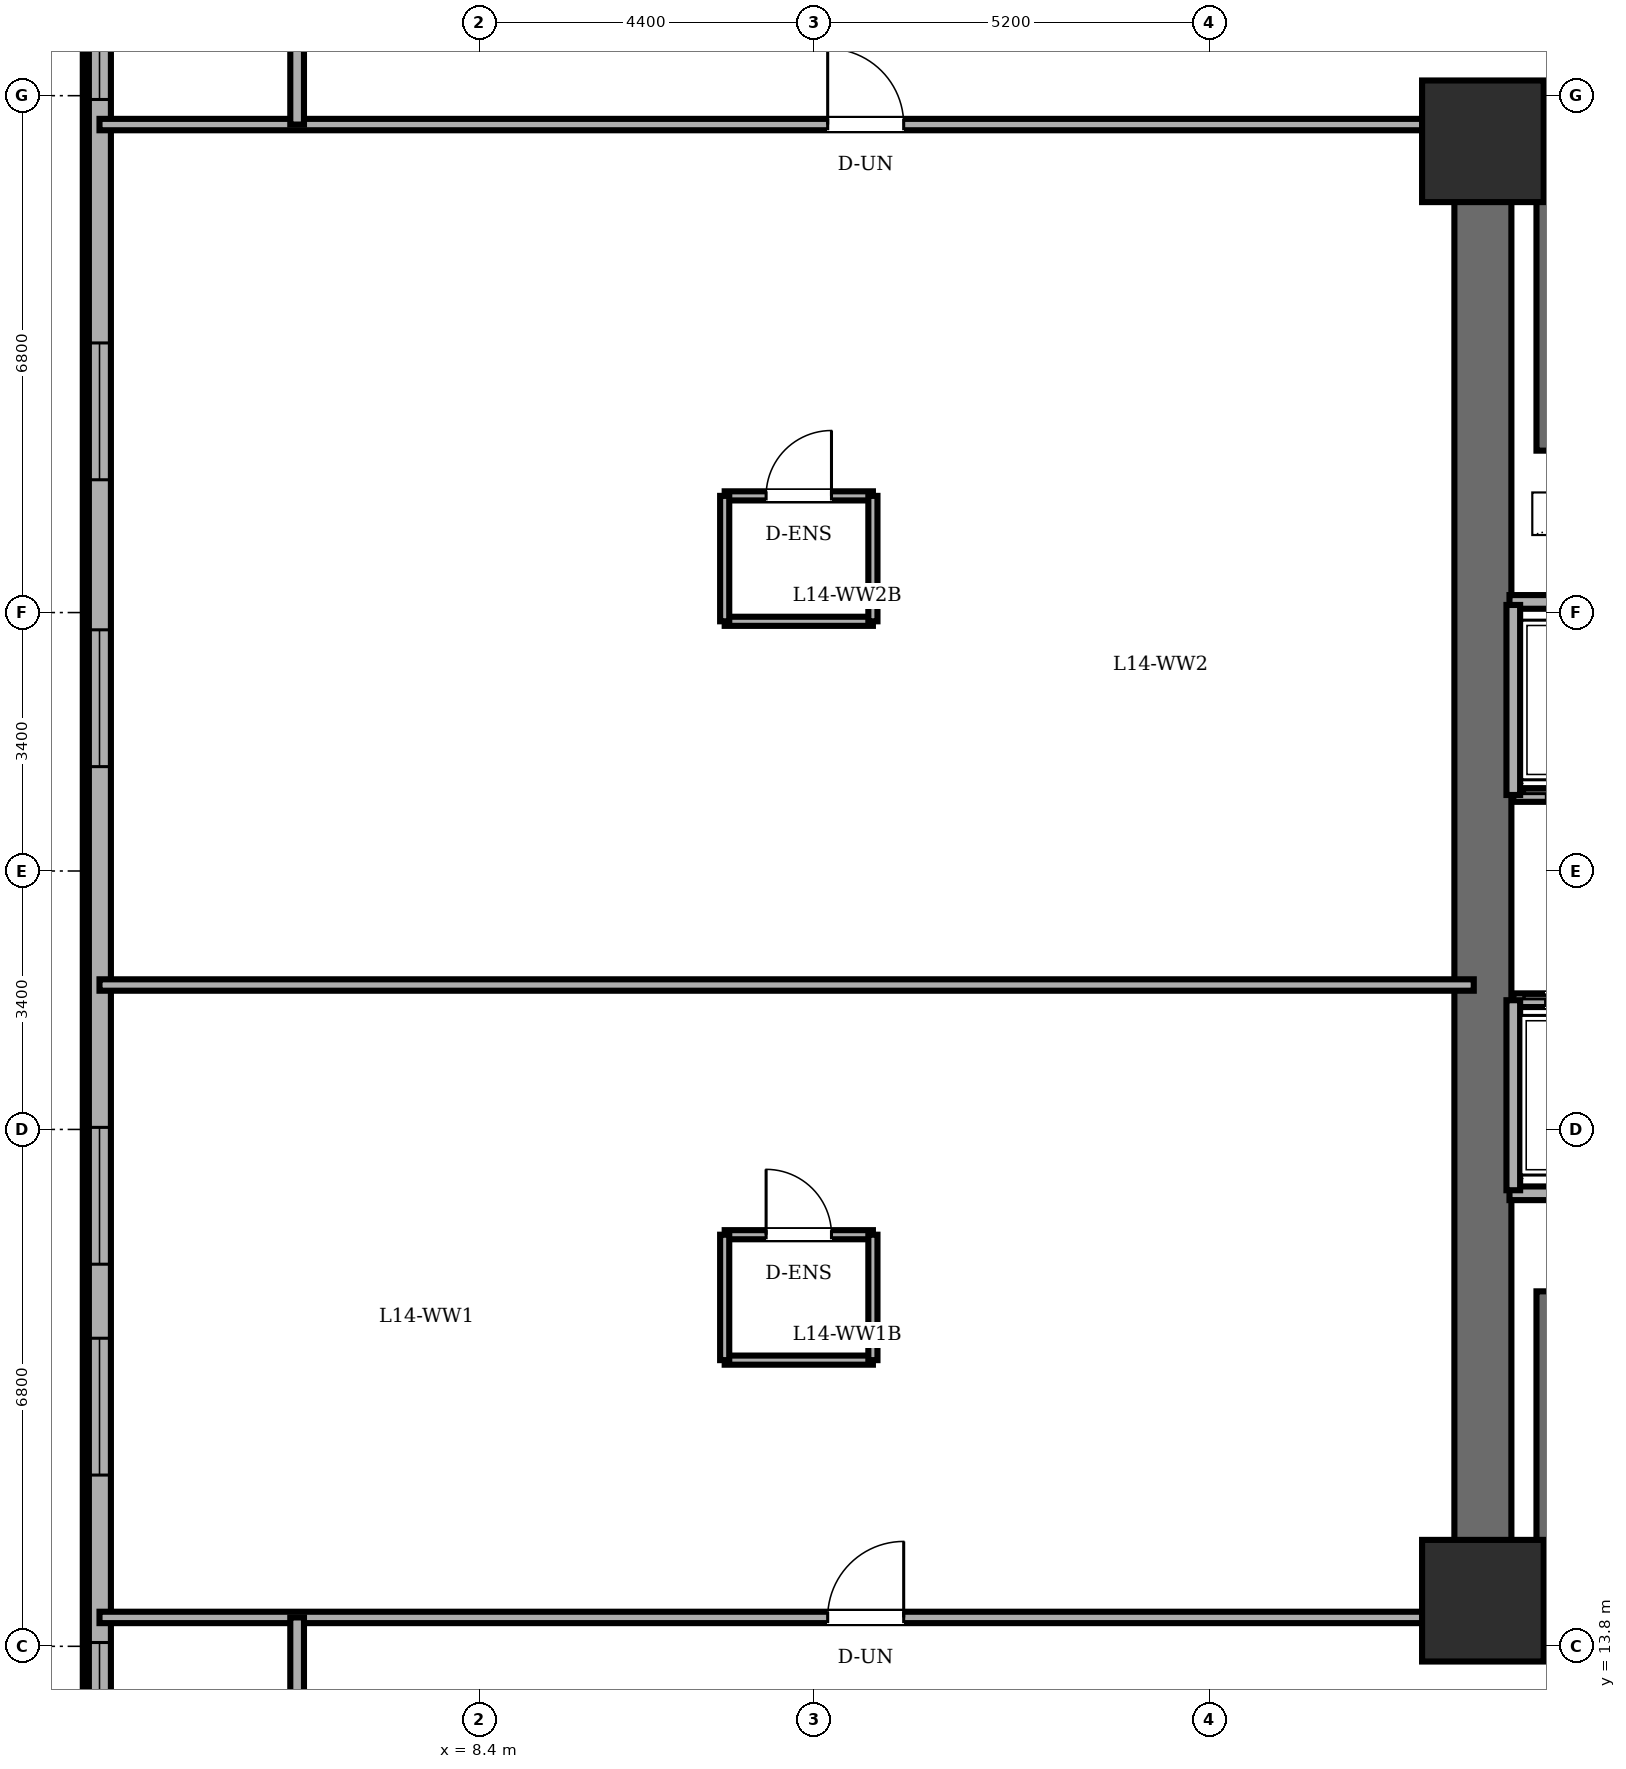
"""IFC4 building model, lengths in metres.
Left out: names, types, materials, properties, quantities, classifications, styles, units other than length and angle.
Written with IfcOpenShell. Run it as: python <this file> out.ifc"""

import sys

from ifc_helpers import new_model, si_unit, direction, frame, frame_2d, origin, origin_2d, place, context, subcontext, project, spatial, rectangle, extrude, element, fill, save


model = new_model("IFC4")
c1 = context("Model", 3, precision=1e-05, world=origin(), true_north=direction((0.0, 1.0)))
c2 = subcontext(c1, "Body", "Model", "MODEL_VIEW")
j1 = project(units=[si_unit("LENGTHUNIT", "METRE"), si_unit("PLANEANGLEUNIT", "RADIAN")], contexts=[c1])
p1 = place(None, origin())
s1 = spatial("IfcSite", under=j1, at=p1, CompositionType="ELEMENT")
p2 = place(p1, origin())
s2 = spatial("IfcBuilding", under=s1, at=p2, CompositionType="ELEMENT")
p3 = place(p2, frame((0.0, 0.0, 54.0)))
s3 = spatial("IfcBuildingStorey", under=s2, at=p3, CompositionType="ELEMENT", Elevation=54.0)
for number, where, z_axis, x_axis in (
    (1, (21.6, 14.4, 0.0), (0.0, 0.0, 1.0), (1.0, 0.0, 0.0)),
    (2, (21.6, 33.6, 0.0), (0.0, 0.0, 1.0), (1.0, 0.0, 0.0)),
):
    element("IfcColumn", number, at=place(p3, frame(where, z_axis=z_axis, x_axis=x_axis)), inside=s3, PredefinedType="COLUMN", context=c2, shape_type="SweptSolid", body=[
        extrude(rectangle(XDim=1.6, YDim=1.6, at=origin_2d()), origin(), (0.0, 0.0, 1.0), 3.6),
    ])
p4 = place(p3, frame((3.4, 40.2, 0.0), z_axis=(0.0, 0.0, 1.0), x_axis=(0.0, -1.0, 0.0)))
e3 = element("IfcWall", 3, at=p4, inside=s3, PredefinedType="SOLIDWALL", context=c2, shape_type="SweptSolid", body=[
    extrude(rectangle(XDim=32.4, YDim=0.3, at=frame_2d((16.2, 0.0))), origin(), (0.0, 0.0, 1.0), 3.4),
])
p5 = place(p4, frame((1.235, 0.0, 0.85)))
e4 = element("IfcOpeningElement", 4, at=p5, cuts=e3, PredefinedType="OPENING", context=c2, shape_type="SweptSolid", body=[
    extrude(rectangle(XDim=1.8, YDim=1.55, at=frame_2d((0.9, 0.775))), frame((0.0, 0.16, 0.0), z_axis=(0.0, -1.0, 0.0), x_axis=(1.0, 0.0, 0.0)), (0.0, 0.0, 1.0), 0.32),
])
p6 = place(p4, frame((4.25, 0.0, 0.85)))
e5 = element("IfcOpeningElement", 5, at=p6, cuts=e3, PredefinedType="OPENING", context=c2, shape_type="SweptSolid", body=[
    extrude(rectangle(XDim=1.8, YDim=1.55, at=frame_2d((0.9, 0.775))), frame((0.0, 0.16, 0.0), z_axis=(0.0, -1.0, 0.0), x_axis=(1.0, 0.0, 0.0)), (0.0, 0.0, 1.0), 0.32),
])
p7 = place(p4, frame((9.253, 0.0, 0.85)))
e6 = element("IfcOpeningElement", 6, at=p7, cuts=e3, PredefinedType="OPENING", context=c2, shape_type="SweptSolid", body=[
    extrude(rectangle(XDim=1.8, YDim=1.55, at=frame_2d((0.9, 0.775))), frame((0.0, 0.16, 0.0), z_axis=(0.0, -1.0, 0.0), x_axis=(1.0, 0.0, 0.0)), (0.0, 0.0, 1.0), 0.32),
])
p8 = place(p4, frame((13.027, 0.0, 0.85)))
e7 = element("IfcOpeningElement", 7, at=p8, cuts=e3, PredefinedType="OPENING", context=c2, shape_type="SweptSolid", body=[
    extrude(rectangle(XDim=1.8, YDim=1.55, at=frame_2d((0.9, 0.775))), frame((0.0, 0.16, 0.0), z_axis=(0.0, -1.0, 0.0), x_axis=(1.0, 0.0, 0.0)), (0.0, 0.0, 1.0), 0.32),
])
p9 = place(p4, frame((19.573, 0.0, 0.85)))
e8 = element("IfcOpeningElement", 8, at=p9, cuts=e3, PredefinedType="OPENING", context=c2, shape_type="SweptSolid", body=[
    extrude(rectangle(XDim=1.8, YDim=1.55, at=frame_2d((0.9, 0.775))), frame((0.0, 0.16, 0.0), z_axis=(0.0, -1.0, 0.0), x_axis=(1.0, 0.0, 0.0)), (0.0, 0.0, 1.0), 0.32),
])
p10 = place(p4, frame((22.347, 0.0, 0.85)))
e9 = element("IfcOpeningElement", 9, at=p10, cuts=e3, PredefinedType="OPENING", context=c2, shape_type="SweptSolid", body=[
    extrude(rectangle(XDim=1.8, YDim=1.55, at=frame_2d((0.9, 0.775))), frame((0.0, 0.16, 0.0), z_axis=(0.0, -1.0, 0.0), x_axis=(1.0, 0.0, 0.0)), (0.0, 0.0, 1.0), 0.32),
])
p11 = place(p4, frame((26.35, 0.0, 0.85)))
e10 = element("IfcOpeningElement", 10, at=p11, cuts=e3, PredefinedType="OPENING", context=c2, shape_type="SweptSolid", body=[
    extrude(rectangle(XDim=1.8, YDim=1.55, at=frame_2d((0.9, 0.775))), frame((0.0, 0.16, 0.0), z_axis=(0.0, -1.0, 0.0), x_axis=(1.0, 0.0, 0.0)), (0.0, 0.0, 1.0), 0.32),
])
p12 = place(p4, frame((29.365, 0.0, 0.85)))
e11 = element("IfcOpeningElement", 11, at=p12, cuts=e3, PredefinedType="OPENING", context=c2, shape_type="SweptSolid", body=[
    extrude(rectangle(XDim=1.8, YDim=1.55, at=frame_2d((0.9, 0.775))), frame((0.0, 0.16, 0.0), z_axis=(0.0, -1.0, 0.0), x_axis=(1.0, 0.0, 0.0)), (0.0, 0.0, 1.0), 0.32),
])
p13 = place(p3, frame((21.6, 14.4, 0.0), z_axis=(0.0, 0.0, 1.0), x_axis=(0.0, 1.0, 0.0)))
e12 = element("IfcWall", 12, at=p13, inside=s3, PredefinedType="SHEAR", context=c2, shape_type="SweptSolid", body=[
    extrude(rectangle(XDim=19.2, YDim=0.75, at=frame_2d((9.6, 0.0))), origin(), (0.0, 0.0, 1.0), 3.4),
])
for number, where, z_axis, x_axis in (
    (13, (21.6, 33.6, 0.0), (0.0, 0.0, 1.0), (1.0, 0.0, 0.0)),
    (14, (37.2, 14.4, 0.0), (0.0, 0.0, 1.0), (-1.0, 0.0, 0.0)),
):
    element("IfcWall", number, at=place(p3, frame(where, z_axis=z_axis, x_axis=x_axis)), inside=s3, PredefinedType="SHEAR", context=c2, shape_type="SweptSolid", body=[
        extrude(rectangle(XDim=15.6, YDim=0.75, at=frame_2d((7.8, 0.0))), origin(), (0.0, 0.0, 1.0), 3.4),
    ])
for number, where, z_axis, x_axis in (
    (15, (22.48, 29.53, 0.0), (0.0, 0.0, 1.0), (0.0, 1.0, 0.0)),
    (16, (22.48, 14.89, 0.0), (0.0, 0.0, 1.0), (0.0, 1.0, 0.0)),
):
    element("IfcWall", number, at=place(p3, frame(where, z_axis=z_axis, x_axis=x_axis)), inside=s3, PredefinedType="SOLIDWALL", context=c2, shape_type="SweptSolid", body=[
        extrude(rectangle(XDim=3.58, YDim=0.35, at=frame_2d((1.79, 0.0))), origin(), (0.0, 0.0, 1.0), 3.4),
    ])
p14 = place(p3, frame((21.95, 27.54, 0.0), z_axis=(0.0, 0.0, 1.0), x_axis=(1.0, 0.0, 0.0)))
e17 = element("IfcWall", 17, at=p14, inside=s3, PredefinedType="PARTITIONING", context=c2, shape_type="SweptSolid", body=[
    extrude(rectangle(XDim=10.56, YDim=0.18, at=frame_2d((5.28, 0.0))), origin(), (0.0, 0.0, 1.0), 3.4),
])
p15 = place(p3, frame((21.95, 19.76, 0.0), z_axis=(0.0, 0.0, 1.0), x_axis=(1.0, 0.0, 0.0)))
e18 = element("IfcWall", 18, at=p15, inside=s3, PredefinedType="PARTITIONING", context=c2, shape_type="SweptSolid", body=[
    extrude(rectangle(XDim=14.87, YDim=0.18, at=frame_2d((7.435, 0.0))), origin(), (0.0, 0.0, 1.0), 3.4),
])
p16 = place(p3, frame((24.02, 25.0, 0.0), z_axis=(0.0, 0.0, 1.0), x_axis=(-1.0, 0.0, 0.0)))
e19 = element("IfcWall", 19, at=p16, inside=s3, PredefinedType="PARTITIONING", context=c2, shape_type="SweptSolid", body=[
    extrude(rectangle(XDim=2.02, YDim=0.18, at=frame_2d((1.01, 0.0))), origin(), (0.0, 0.0, 1.0), 3.4),
])
p17 = place(p16, frame((0.435, 0.0, 0.0)))
e20 = element("IfcOpeningElement", 20, at=p17, cuts=e19, PredefinedType="OPENING", context=c2, shape_type="SweptSolid", body=[
    extrude(rectangle(XDim=1.15, YDim=2.2, at=frame_2d((0.575, 1.1))), frame((0.0, 0.1, 0.0), z_axis=(0.0, -1.0, 0.0), x_axis=(1.0, 0.0, 0.0)), (0.0, 0.0, 1.0), 0.2),
])
p18 = place(p3, frame((22.0, 27.5, 0.0), z_axis=(0.0, 0.0, 1.0), x_axis=(0.0, -1.0, 0.0)))
e21 = element("IfcWall", 21, at=p18, inside=s3, PredefinedType="PARTITIONING", context=c2, shape_type="SweptSolid", body=[
    extrude(rectangle(XDim=2.5, YDim=0.18, at=frame_2d((1.25, 0.0))), origin(), (0.0, 0.0, 1.0), 3.4),
])
p19 = place(p3, frame((22.0, 22.3, 0.0), z_axis=(0.0, 0.0, 1.0), x_axis=(1.0, 0.0, 0.0)))
e22 = element("IfcWall", 22, at=p19, inside=s3, PredefinedType="PARTITIONING", context=c2, shape_type="SweptSolid", body=[
    extrude(rectangle(XDim=2.0, YDim=0.18, at=frame_2d((1.0, 0.0))), origin(), (0.0, 0.0, 1.0), 3.4),
])
p20 = place(p19, frame((0.425, 0.0, 0.0)))
e23 = element("IfcOpeningElement", 23, at=p20, cuts=e22, PredefinedType="OPENING", context=c2, shape_type="SweptSolid", body=[
    extrude(rectangle(XDim=1.15, YDim=2.2, at=frame_2d((0.575, 1.1))), frame((0.0, 0.1, 0.0), z_axis=(0.0, -1.0, 0.0), x_axis=(1.0, 0.0, 0.0)), (0.0, 0.0, 1.0), 0.2),
])
p21 = place(p3, frame((22.0, 22.3, 0.0), z_axis=(0.0, 0.0, 1.0), x_axis=(0.0, -1.0, 0.0)))
e24 = element("IfcWall", 24, at=p21, inside=s3, PredefinedType="PARTITIONING", context=c2, shape_type="SweptSolid", body=[
    extrude(rectangle(XDim=2.5, YDim=0.18, at=frame_2d((1.25, 0.0))), origin(), (0.0, 0.0, 1.0), 3.4),
])
p22 = place(p3, frame((11.625, 19.215, 0.0), z_axis=(0.0, 0.0, 1.0), x_axis=(1.0, 0.0, 0.0)))
e25 = element("IfcWall", 25, at=p22, inside=s3, PredefinedType="PARTITIONING", context=c2, shape_type="SweptSolid", body=[
    extrude(rectangle(XDim=1.95, YDim=0.12, at=frame_2d((0.975, 0.0))), origin(), (0.0, 0.0, 1.0), 3.4),
])
p23 = place(p22, frame((0.545, 0.0, 0.0)))
e26 = element("IfcOpeningElement", 26, at=p23, cuts=e25, PredefinedType="OPENING", context=c2, shape_type="SweptSolid", body=[
    extrude(rectangle(XDim=0.86, YDim=2.1, at=frame_2d((0.43, 1.05))), frame((0.0, 0.07, 0.0), z_axis=(0.0, -1.0, 0.0), x_axis=(1.0, 0.0, 0.0)), (0.0, 0.0, 1.0), 0.14),
])
p24 = place(p3, frame((13.575, 17.565, 0.0), z_axis=(0.0, 0.0, 1.0), x_axis=(-1.0, 0.0, 0.0)))
e27 = element("IfcWall", 27, at=p24, inside=s3, PredefinedType="PARTITIONING", context=c2, shape_type="SweptSolid", body=[
    extrude(rectangle(XDim=1.95, YDim=0.12, at=frame_2d((0.975, 0.0))), origin(), (0.0, 0.0, 1.0), 3.4),
])
for number, where, z_axis, x_axis in (
    (28, (11.625, 19.215, 0.0), (0.0, 0.0, 1.0), (0.0, -1.0, 0.0)),
    (29, (13.575, 17.565, 0.0), (0.0, 0.0, 1.0), (0.0, 1.0, 0.0)),
):
    element("IfcWall", number, at=place(p3, frame(where, z_axis=z_axis, x_axis=x_axis)), inside=s3, PredefinedType="PARTITIONING", context=c2, shape_type="SweptSolid", body=[
        extrude(rectangle(XDim=1.65, YDim=0.12, at=frame_2d((0.825, 0.0))), origin(), (0.0, 0.0, 1.0), 3.4),
    ])
p25 = place(p3, frame((11.625, 28.935, 0.0), z_axis=(0.0, 0.0, 1.0), x_axis=(1.0, 0.0, 0.0)))
e30 = element("IfcWall", 30, at=p25, inside=s3, PredefinedType="PARTITIONING", context=c2, shape_type="SweptSolid", body=[
    extrude(rectangle(XDim=1.95, YDim=0.12, at=frame_2d((0.975, 0.0))), origin(), (0.0, 0.0, 1.0), 3.4),
])
p26 = place(p25, frame((0.545, 0.0, 0.0)))
e31 = element("IfcOpeningElement", 31, at=p26, cuts=e30, PredefinedType="OPENING", context=c2, shape_type="SweptSolid", body=[
    extrude(rectangle(XDim=0.86, YDim=2.1, at=frame_2d((0.43, 1.05))), frame((0.0, 0.07, 0.0), z_axis=(0.0, -1.0, 0.0), x_axis=(1.0, 0.0, 0.0)), (0.0, 0.0, 1.0), 0.14),
])
p27 = place(p3, frame((13.575, 27.285, 0.0), z_axis=(0.0, 0.0, 1.0), x_axis=(-1.0, 0.0, 0.0)))
e32 = element("IfcWall", 32, at=p27, inside=s3, PredefinedType="PARTITIONING", context=c2, shape_type="SweptSolid", body=[
    extrude(rectangle(XDim=1.95, YDim=0.12, at=frame_2d((0.975, 0.0))), origin(), (0.0, 0.0, 1.0), 3.4),
])
for number, where, z_axis, x_axis in (
    (33, (11.625, 28.935, 0.0), (0.0, 0.0, 1.0), (0.0, -1.0, 0.0)),
    (34, (13.575, 27.285, 0.0), (0.0, 0.0, 1.0), (0.0, 1.0, 0.0)),
):
    element("IfcWall", number, at=place(p3, frame(where, z_axis=z_axis, x_axis=x_axis)), inside=s3, PredefinedType="PARTITIONING", context=c2, shape_type="SweptSolid", body=[
        extrude(rectangle(XDim=1.65, YDim=0.12, at=frame_2d((0.825, 0.0))), origin(), (0.0, 0.0, 1.0), 3.4),
    ])
p28 = place(p3, frame((3.4, 14.18, 0.0), z_axis=(0.0, 0.0, 1.0), x_axis=(1.0, 0.0, 0.0)))
e35 = element("IfcWall", 35, at=p28, inside=s3, PredefinedType="PARTITIONING", context=c2, shape_type="SweptSolid", body=[
    extrude(rectangle(XDim=18.08, YDim=0.15, at=frame_2d((9.04, 0.0))), origin(), (0.0, 0.0, 1.0), 3.4),
])
p29 = place(p28, frame((9.58, 0.0, 0.0)))
e36 = element("IfcOpeningElement", 36, at=p29, cuts=e35, PredefinedType="OPENING", context=c2, shape_type="SweptSolid", body=[
    extrude(rectangle(XDim=1.0, YDim=2.15, at=frame_2d((0.5, 1.075))), frame((0.0, 0.085, 0.0), z_axis=(0.0, -1.0, 0.0), x_axis=(1.0, 0.0, 0.0)), (0.0, 0.0, 1.0), 0.17),
])
p30 = place(p3, frame((3.4, 22.5, 0.0), z_axis=(0.0, 0.0, 1.0), x_axis=(1.0, 0.0, 0.0)))
e37 = element("IfcWall", 37, at=p30, inside=s3, PredefinedType="PARTITIONING", context=c2, shape_type="SweptSolid", body=[
    extrude(rectangle(XDim=18.08, YDim=0.15, at=frame_2d((9.04, 0.0))), origin(), (0.0, 0.0, 1.0), 3.4),
])
p31 = place(p3, frame((3.4, 33.82, 0.0), z_axis=(0.0, 0.0, 1.0), x_axis=(1.0, 0.0, 0.0)))
e38 = element("IfcWall", 38, at=p31, inside=s3, PredefinedType="PARTITIONING", context=c2, shape_type="SweptSolid", body=[
    extrude(rectangle(XDim=18.08, YDim=0.15, at=frame_2d((9.04, 0.0))), origin(), (0.0, 0.0, 1.0), 3.4),
])
p32 = place(p31, frame((9.58, 0.0, 0.0)))
e39 = element("IfcOpeningElement", 39, at=p32, cuts=e38, PredefinedType="OPENING", context=c2, shape_type="SweptSolid", body=[
    extrude(rectangle(XDim=1.0, YDim=2.15, at=frame_2d((0.5, 1.075))), frame((0.0, 0.085, 0.0), z_axis=(0.0, -1.0, 0.0), x_axis=(1.0, 0.0, 0.0)), (0.0, 0.0, 1.0), 0.17),
])
for number, where, z_axis, x_axis in (
    (40, (6.0, 11.72, 0.0), (0.0, 0.0, 1.0), (0.0, 1.0, 0.0)),
    (41, (6.0, 33.82, 0.0), (0.0, 0.0, 1.0), (0.0, 1.0, 0.0)),
):
    element("IfcWall", number, at=place(p3, frame(where, z_axis=z_axis, x_axis=x_axis)), inside=s3, PredefinedType="PARTITIONING", context=c2, shape_type="SweptSolid", body=[
        extrude(rectangle(XDim=2.46, YDim=0.18, at=frame_2d((1.23, 0.0))), origin(), (0.0, 0.0, 1.0), 3.4),
    ])
p33 = place(p6, origin())
e42 = element("IfcWindow", 42, at=p33, inside=s3, PartitioningType="DOUBLE_PANEL_VERTICAL", PredefinedType="WINDOW", context=c2, shape_type="SweptSolid", body=[
    extrude(rectangle(XDim=1.8, YDim=1.55, at=frame_2d((0.9, 0.775))), frame((0.0, 0.03, 0.0), z_axis=(0.0, -1.0, 0.0), x_axis=(1.0, 0.0, 0.0)), (0.0, 0.0, 1.0), 0.06),
])
fill(e5, e42)
p34 = place(p7, origin())
e43 = element("IfcWindow", 43, at=p34, inside=s3, PartitioningType="DOUBLE_PANEL_VERTICAL", PredefinedType="WINDOW", context=c2, shape_type="SweptSolid", body=[
    extrude(rectangle(XDim=1.8, YDim=1.55, at=frame_2d((0.9, 0.775))), frame((0.0, 0.03, 0.0), z_axis=(0.0, -1.0, 0.0), x_axis=(1.0, 0.0, 0.0)), (0.0, 0.0, 1.0), 0.06),
])
fill(e6, e43)
p35 = place(p8, origin())
e44 = element("IfcWindow", 44, at=p35, inside=s3, PartitioningType="DOUBLE_PANEL_VERTICAL", PredefinedType="WINDOW", context=c2, shape_type="SweptSolid", body=[
    extrude(rectangle(XDim=1.8, YDim=1.55, at=frame_2d((0.9, 0.775))), frame((0.0, 0.03, 0.0), z_axis=(0.0, -1.0, 0.0), x_axis=(1.0, 0.0, 0.0)), (0.0, 0.0, 1.0), 0.06),
])
fill(e7, e44)
p36 = place(p9, origin())
e45 = element("IfcWindow", 45, at=p36, inside=s3, PartitioningType="DOUBLE_PANEL_VERTICAL", PredefinedType="WINDOW", context=c2, shape_type="SweptSolid", body=[
    extrude(rectangle(XDim=1.8, YDim=1.55, at=frame_2d((0.9, 0.775))), frame((0.0, 0.03, 0.0), z_axis=(0.0, -1.0, 0.0), x_axis=(1.0, 0.0, 0.0)), (0.0, 0.0, 1.0), 0.06),
])
fill(e8, e45)
p37 = place(p10, origin())
e46 = element("IfcWindow", 46, at=p37, inside=s3, PartitioningType="DOUBLE_PANEL_VERTICAL", PredefinedType="WINDOW", context=c2, shape_type="SweptSolid", body=[
    extrude(rectangle(XDim=1.8, YDim=1.55, at=frame_2d((0.9, 0.775))), frame((0.0, 0.03, 0.0), z_axis=(0.0, -1.0, 0.0), x_axis=(1.0, 0.0, 0.0)), (0.0, 0.0, 1.0), 0.06),
])
fill(e9, e46)
p38 = place(p11, origin())
e47 = element("IfcWindow", 47, at=p38, inside=s3, PartitioningType="DOUBLE_PANEL_VERTICAL", PredefinedType="WINDOW", context=c2, shape_type="SweptSolid", body=[
    extrude(rectangle(XDim=1.8, YDim=1.55, at=frame_2d((0.9, 0.775))), frame((0.0, 0.03, 0.0), z_axis=(0.0, -1.0, 0.0), x_axis=(1.0, 0.0, 0.0)), (0.0, 0.0, 1.0), 0.06),
])
fill(e10, e47)
p39 = place(p20, origin())
e48 = element("IfcDoor", 48, at=p39, inside=s3, OperationType="DOUBLE_DOOR_SLIDING", PredefinedType="DOOR", context=c2, shape_type="SweptSolid", body=[
    extrude(rectangle(XDim=1.15, YDim=2.2, at=frame_2d((0.575, 1.1))), frame((0.0, 0.025, 0.0), z_axis=(0.0, -1.0, 0.0), x_axis=(1.0, 0.0, 0.0)), (0.0, 0.0, 1.0), 0.05),
])
fill(e23, e48)
p40 = place(p23, origin())
e49 = element("IfcDoor", 49, at=p40, inside=s3, OperationType="SINGLE_SWING_LEFT", PredefinedType="DOOR", context=c2, shape_type="SweptSolid", body=[
    extrude(rectangle(XDim=0.86, YDim=2.1, at=frame_2d((0.43, 1.05))), frame((0.0, 0.025, 0.0), z_axis=(0.0, -1.0, 0.0), x_axis=(1.0, 0.0, 0.0)), (0.0, 0.0, 1.0), 0.05),
])
fill(e26, e49)
p41 = place(p26, origin())
e50 = element("IfcDoor", 50, at=p41, inside=s3, OperationType="SINGLE_SWING_RIGHT", PredefinedType="DOOR", context=c2, shape_type="SweptSolid", body=[
    extrude(rectangle(XDim=0.86, YDim=2.1, at=frame_2d((0.43, 1.05))), frame((0.0, 0.025, 0.0), z_axis=(0.0, -1.0, 0.0), x_axis=(1.0, 0.0, 0.0)), (0.0, 0.0, 1.0), 0.05),
])
fill(e31, e50)
p42 = place(p29, origin())
e51 = element("IfcDoor", 51, at=p42, inside=s3, OperationType="SINGLE_SWING_RIGHT", PredefinedType="DOOR", context=c2, shape_type="SweptSolid", body=[
    extrude(rectangle(XDim=1.0, YDim=2.15, at=frame_2d((0.5, 1.075))), frame((0.0, 0.025, 0.0), z_axis=(0.0, -1.0, 0.0), x_axis=(1.0, 0.0, 0.0)), (0.0, 0.0, 1.0), 0.05),
])
fill(e36, e51)
p43 = place(p32, origin())
e52 = element("IfcDoor", 52, at=p43, inside=s3, OperationType="SINGLE_SWING_LEFT", PredefinedType="DOOR", context=c2, shape_type="SweptSolid", body=[
    extrude(rectangle(XDim=1.0, YDim=2.15, at=frame_2d((0.5, 1.075))), frame((0.0, 0.025, 0.0), z_axis=(0.0, -1.0, 0.0), x_axis=(1.0, 0.0, 0.0)), (0.0, 0.0, 1.0), 0.05),
])
fill(e39, e52)
save(model, sys.argv[1])
